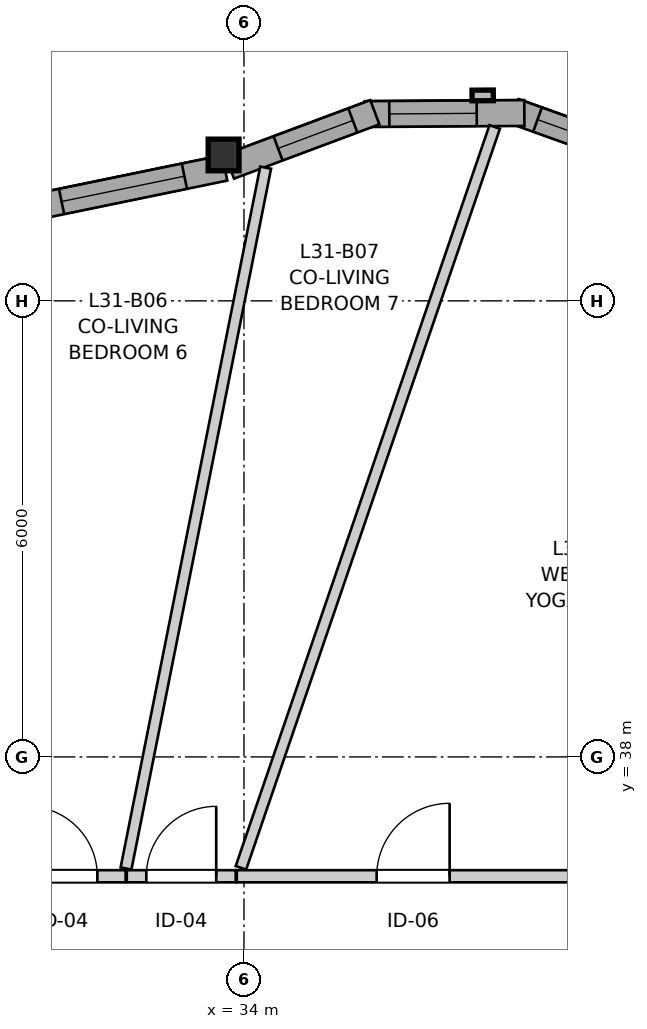
"""IFC4 building model, lengths in metres.
Left out: names, types, materials, properties, quantities, classifications, styles, units other than length and angle.
Written with IfcOpenShell. Run it as: python <this file> out.ifc"""

import sys

from ifc_helpers import new_model, si_unit, direction, frame, frame_2d, origin, origin_2d, place, context, subcontext, project, spatial, rectangle, i_section, extrude, source, transform, mapped, element, fill, save


model = new_model("IFC4")
c1 = context("Model", 3, precision=1e-05, world=origin(), true_north=direction((0.0, 1.0)))
c2 = subcontext(c1, "Body", "Model", "MODEL_VIEW")
j1 = project(units=[si_unit("LENGTHUNIT", "METRE"), si_unit("PLANEANGLEUNIT", "RADIAN")], contexts=[c1])
p1 = place(None, origin())
s1 = spatial("IfcSite", under=j1, at=p1, CompositionType="ELEMENT")
p2 = place(p1, origin())
s2 = spatial("IfcBuilding", under=s1, at=p2, CompositionType="ELEMENT")
p3 = place(p2, frame((0.0, 0.0, 105.6)))
s3 = spatial("IfcBuildingStorey", under=s2, at=p3, CompositionType="ELEMENT", Elevation=105.6)
m1 = source(origin(), c2, "Body", "SweptSolid", [
    extrude(i_section(OverallWidth=0.406, OverallDepth=0.416, WebThickness=0.027, FlangeThickness=0.044, FilletRadius=0.015, at=origin_2d()), origin(), (0.0, 0.0, 1.0), 2.935),
])
p4 = place(p3, frame((33.732, 45.92, 0.0), z_axis=(0.0, 0.0, 1.0), x_axis=(1.0, 0.0, 0.0)))
e1 = element("IfcColumn", 1, at=p4, inside=s3, PredefinedType="PILASTER", context=c2, shape_type="MappedRepresentation", body=[
    mapped(m1, transform((0.0, 0.0, 0.0), x_axis=(1.0, 0.0, 0.0), y_axis=(0.0, 1.0, 0.0), z_axis=(0.0, 0.0, 1.0), scale=1.0)),
])
p5 = place(p3, frame((39.533, 45.787, 0.0), z_axis=(0.0, 0.0, 1.0), x_axis=(-0.941523304278, 0.336947870598, 0.0)))
e2 = element("IfcWall", 2, at=p5, inside=s3, PredefinedType="SOLIDWALL", context=c2, shape_type="SweptSolid", body=[
    extrude(rectangle(XDim=2.099, YDim=0.34, at=frame_2d((1.05, 0.0))), origin(), (0.0, 0.0, 1.0), 2.465),
])
p6 = place(p5, frame((0.324, 0.0, 0.82)))
e3 = element("IfcOpeningElement", 3, at=p6, cuts=e2, PredefinedType="OPENING", context=c2, shape_type="SweptSolid", body=[
    extrude(rectangle(XDim=1.45, YDim=1.25, at=frame_2d((0.725, 0.625))), frame((0.0, 0.18, 0.0), z_axis=(0.0, -1.0, 0.0), x_axis=(1.0, 0.0, 0.0)), (0.0, 0.0, 1.0), 0.36),
])
p7 = place(p3, frame((37.689, 46.471, 0.0), z_axis=(0.0, 0.0, 1.0), x_axis=(-0.999976456891, -0.00686189939, 0.0)))
e4 = element("IfcWall", 4, at=p7, inside=s3, PredefinedType="SOLIDWALL", context=c2, shape_type="SweptSolid", body=[
    extrude(rectangle(XDim=2.099, YDim=0.34, at=frame_2d((1.05, 0.0))), origin(), (0.0, 0.0, 1.0), 2.465),
])
p8 = place(p7, frame((0.627, 0.0, 0.82)))
e5 = element("IfcOpeningElement", 5, at=p8, cuts=e4, PredefinedType="OPENING", context=c2, shape_type="SweptSolid", body=[
    extrude(rectangle(XDim=1.15, YDim=1.2, at=frame_2d((0.575, 0.6))), frame((0.0, 0.18, 0.0), z_axis=(0.0, -1.0, 0.0), x_axis=(1.0, 0.0, 0.0)), (0.0, 0.0, 1.0), 0.36),
])
p9 = place(p3, frame((35.722, 46.481, 0.0), z_axis=(0.0, 0.0, 1.0), x_axis=(-0.9368002254, -0.349864741994, 0.0)))
e6 = element("IfcWall", 6, at=p9, inside=s3, PredefinedType="SOLIDWALL", context=c2, shape_type="SweptSolid", body=[
    extrude(rectangle(XDim=2.041, YDim=0.34, at=frame_2d((1.021, 0.0))), origin(), (0.0, 0.0, 1.0), 2.465),
])
p10 = place(p9, frame((0.309, 0.0, 0.82)))
e7 = element("IfcOpeningElement", 7, at=p10, cuts=e6, PredefinedType="OPENING", context=c2, shape_type="SweptSolid", body=[
    extrude(rectangle(XDim=1.05, YDim=1.45, at=frame_2d((0.525, 0.725))), frame((0.0, 0.18, 0.0), z_axis=(0.0, -1.0, 0.0), x_axis=(1.0, 0.0, 0.0)), (0.0, 0.0, 1.0), 0.36),
])
p11 = place(p3, frame((33.747, 45.749, 0.0), z_axis=(0.0, 0.0, 1.0), x_axis=(-0.979440240026, -0.201734519153, 0.0)))
e8 = element("IfcWall", 8, at=p11, inside=s3, PredefinedType="SOLIDWALL", context=c2, shape_type="SweptSolid", body=[
    extrude(rectangle(XDim=3.124, YDim=0.34, at=frame_2d((1.562, 0.0))), origin(), (0.0, 0.0, 1.0), 2.465),
])
p12 = place(p11, frame((0.541, 0.0, 0.82)))
e9 = element("IfcOpeningElement", 9, at=p12, cuts=e8, PredefinedType="OPENING", context=c2, shape_type="SweptSolid", body=[
    extrude(rectangle(XDim=1.65, YDim=1.45, at=frame_2d((0.825, 0.725))), frame((0.0, 0.18, 0.0), z_axis=(0.0, -1.0, 0.0), x_axis=(1.0, 0.0, 0.0)), (0.0, 0.0, 1.0), 0.36),
])
p13 = place(p3, frame((33.906, 36.43, 0.0), z_axis=(0.0, 0.0, 1.0), x_axis=(1.0, 0.0, 0.0)))
e10 = element("IfcWall", 10, at=p13, inside=s3, PredefinedType="PARTITIONING", context=c2, shape_type="SweptSolid", body=[
    extrude(rectangle(XDim=4.624, YDim=0.16, at=frame_2d((2.312, 0.0))), origin(), (0.0, 0.0, 1.0), 2.573),
])
p14 = place(p13, frame((1.84, 0.0, 0.0)))
e11 = element("IfcOpeningElement", 11, at=p14, cuts=e10, PredefinedType="OPENING", context=c2, shape_type="SweptSolid", body=[
    extrude(rectangle(XDim=0.96, YDim=2.1, at=frame_2d((0.48, 1.05))), frame((0.0, 0.09, 0.0), z_axis=(0.0, -1.0, 0.0), x_axis=(1.0, 0.0, 0.0)), (0.0, 0.0, 1.0), 0.18),
])
p15 = place(p3, frame((30.824, 36.43, 0.0), z_axis=(0.0, 0.0, 1.0), x_axis=(1.0, 0.0, 0.0)))
e12 = element("IfcWall", 12, at=p15, inside=s3, PredefinedType="PARTITIONING", context=c2, shape_type="SweptSolid", body=[
    extrude(rectangle(XDim=1.619, YDim=0.16, at=frame_2d((0.81, 0.0))), origin(), (0.0, 0.0, 1.0), 2.935),
])
p16 = place(p15, frame((0.327, 0.0, 0.0)))
e13 = element("IfcOpeningElement", 13, at=p16, cuts=e12, PredefinedType="OPENING", context=c2, shape_type="SweptSolid", body=[
    extrude(rectangle(XDim=0.92, YDim=2.1, at=frame_2d((0.46, 1.05))), frame((0.0, 0.09, 0.0), z_axis=(0.0, -1.0, 0.0), x_axis=(1.0, 0.0, 0.0)), (0.0, 0.0, 1.0), 0.18),
])
p17 = place(p3, frame((32.458, 36.43, 0.0), z_axis=(0.0, 0.0, 1.0), x_axis=(1.0, 0.0, 0.0)))
e14 = element("IfcWall", 14, at=p17, inside=s3, PredefinedType="PARTITIONING", context=c2, shape_type="SweptSolid", body=[
    extrude(rectangle(XDim=1.433, YDim=0.16, at=frame_2d((0.717, 0.0))), origin(), (0.0, 0.0, 1.0), 2.935),
])
p18 = place(p17, frame((0.257, 0.0, 0.0)))
e15 = element("IfcOpeningElement", 15, at=p18, cuts=e14, PredefinedType="OPENING", context=c2, shape_type="SweptSolid", body=[
    extrude(rectangle(XDim=0.92, YDim=2.1, at=frame_2d((0.46, 1.05))), frame((0.0, 0.09, 0.0), z_axis=(0.0, -1.0, 0.0), x_axis=(1.0, 0.0, 0.0)), (0.0, 0.0, 1.0), 0.18),
])
p19 = place(p3, frame((33.96, 36.541, 0.0), z_axis=(0.0, 0.0, 1.0), x_axis=(0.324058346196, 0.946037096662, 0.0)))
e16 = element("IfcWall", 16, at=p19, inside=s3, PredefinedType="PARTITIONING", context=c2, shape_type="SweptSolid", body=[
    extrude(rectangle(XDim=10.302, YDim=0.145, at=frame_2d((5.151, 0.0))), origin(), (0.0, 0.0, 1.0), 2.935),
])
p20 = place(p3, frame((32.448, 36.532, 0.0), z_axis=(0.0, 0.0, 1.0), x_axis=(0.195406965811, 0.980722242897, 0.0)))
e17 = element("IfcWall", 17, at=p20, inside=s3, PredefinedType="PARTITIONING", context=c2, shape_type="SweptSolid", body=[
    extrude(rectangle(XDim=9.402, YDim=0.145, at=frame_2d((4.701, 0.0))), origin(), (0.0, 0.0, 1.0), 2.935),
])
m2 = source(origin(), c2, "Body", "SweptSolid", [
    extrude(rectangle(XDim=1.45, YDim=1.25, at=frame_2d((0.725, 0.625))), frame((0.0, 0.03, 0.0), z_axis=(0.0, -1.0, 0.0), x_axis=(1.0, 0.0, 0.0)), (0.0, 0.0, 1.0), 0.06),
])
p21 = place(p6, origin())
e18 = element("IfcWindow", 18, at=p21, inside=s3, PartitioningType="SINGLE_PANEL", PredefinedType="WINDOW", context=c2, shape_type="MappedRepresentation", body=[
    mapped(m2, transform((0.0, 0.0, 0.0), x_axis=(1.0, 0.0, 0.0), y_axis=(0.0, 1.0, 0.0), z_axis=(0.0, 0.0, 1.0), scale=1.0)),
])
fill(e3, e18)
m3 = source(origin(), c2, "Body", "SweptSolid", [
    extrude(rectangle(XDim=1.15, YDim=1.2, at=frame_2d((0.575, 0.6))), frame((0.0, 0.03, 0.0), z_axis=(0.0, -1.0, 0.0), x_axis=(1.0, 0.0, 0.0)), (0.0, 0.0, 1.0), 0.06),
])
p22 = place(p8, origin())
e19 = element("IfcWindow", 19, at=p22, inside=s3, PartitioningType="SINGLE_PANEL", PredefinedType="WINDOW", context=c2, shape_type="MappedRepresentation", body=[
    mapped(m3, transform((0.0, 0.0, 0.0), x_axis=(1.0, 0.0, 0.0), y_axis=(0.0, 1.0, 0.0), z_axis=(0.0, 0.0, 1.0), scale=1.0)),
])
fill(e5, e19)
m4 = source(origin(), c2, "Body", "SweptSolid", [
    extrude(rectangle(XDim=1.05, YDim=1.45, at=frame_2d((0.525, 0.725))), frame((0.0, 0.03, 0.0), z_axis=(0.0, -1.0, 0.0), x_axis=(1.0, 0.0, 0.0)), (0.0, 0.0, 1.0), 0.06),
])
p23 = place(p10, origin())
e20 = element("IfcWindow", 20, at=p23, inside=s3, PartitioningType="SINGLE_PANEL", PredefinedType="WINDOW", context=c2, shape_type="MappedRepresentation", body=[
    mapped(m4, transform((0.0, 0.0, 0.0), x_axis=(1.0, 0.0, 0.0), y_axis=(0.0, 1.0, 0.0), z_axis=(0.0, 0.0, 1.0), scale=1.0)),
])
fill(e7, e20)
m5 = source(origin(), c2, "Body", "SweptSolid", [
    extrude(rectangle(XDim=1.65, YDim=1.45, at=frame_2d((0.825, 0.725))), frame((0.0, 0.03, 0.0), z_axis=(0.0, -1.0, 0.0), x_axis=(1.0, 0.0, 0.0)), (0.0, 0.0, 1.0), 0.06),
])
p24 = place(p12, origin())
e21 = element("IfcWindow", 21, at=p24, inside=s3, PartitioningType="SINGLE_PANEL", PredefinedType="WINDOW", context=c2, shape_type="MappedRepresentation", body=[
    mapped(m5, transform((0.0, 0.0, 0.0), x_axis=(1.0, 0.0, 0.0), y_axis=(0.0, 1.0, 0.0), z_axis=(0.0, 0.0, 1.0), scale=1.0)),
])
fill(e9, e21)
m6 = source(origin(), c2, "Body", "SweptSolid", [
    extrude(rectangle(XDim=0.96, YDim=2.1, at=frame_2d((0.48, 1.05))), frame((0.0, 0.025, 0.0), z_axis=(0.0, -1.0, 0.0), x_axis=(1.0, 0.0, 0.0)), (0.0, 0.0, 1.0), 0.05),
])
p25 = place(p14, origin())
e22 = element("IfcDoor", 22, at=p25, inside=s3, OperationType="SINGLE_SWING_RIGHT", PredefinedType="DOOR", context=c2, shape_type="MappedRepresentation", body=[
    mapped(m6, transform((0.0, 0.0, 0.0), x_axis=(1.0, 0.0, 0.0), y_axis=(0.0, 1.0, 0.0), z_axis=(0.0, 0.0, 1.0), scale=1.0)),
])
fill(e11, e22)
m7 = source(origin(), c2, "Body", "SweptSolid", [
    extrude(rectangle(XDim=0.92, YDim=2.1, at=frame_2d((0.46, 1.05))), frame((0.0, 0.025, 0.0), z_axis=(0.0, -1.0, 0.0), x_axis=(1.0, 0.0, 0.0)), (0.0, 0.0, 1.0), 0.05),
])
p26 = place(p16, origin())
e23 = element("IfcDoor", 23, at=p26, inside=s3, OperationType="SINGLE_SWING_LEFT", PredefinedType="DOOR", context=c2, shape_type="MappedRepresentation", body=[
    mapped(m7, transform((0.0, 0.0, 0.0), x_axis=(1.0, 0.0, 0.0), y_axis=(0.0, 1.0, 0.0), z_axis=(0.0, 0.0, 1.0), scale=1.0)),
])
fill(e13, e23)
p27 = place(p18, origin())
e24 = element("IfcDoor", 24, at=p27, inside=s3, OperationType="SINGLE_SWING_RIGHT", PredefinedType="DOOR", context=c2, shape_type="MappedRepresentation", body=[
    mapped(m7, transform((0.0, 0.0, 0.0), x_axis=(1.0, 0.0, 0.0), y_axis=(0.0, 1.0, 0.0), z_axis=(0.0, 0.0, 1.0), scale=1.0)),
])
fill(e15, e24)
save(model, sys.argv[1])
